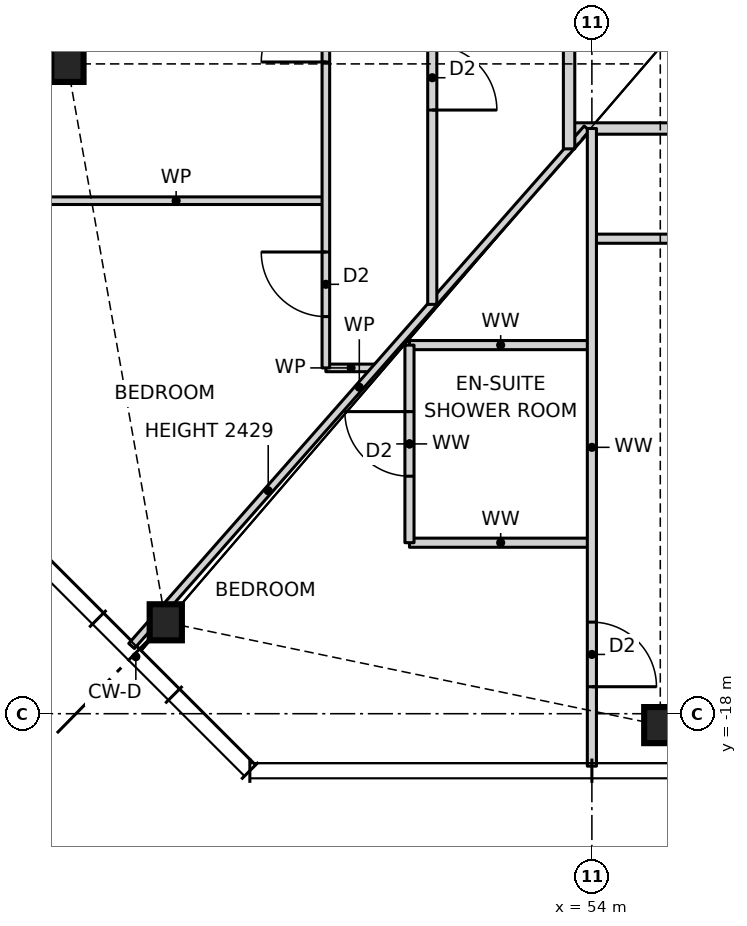
"""IFC4 building model, lengths in metres.
Left out: names, types, materials, properties, quantities, classifications, styles, units other than length and angle.
Written with IfcOpenShell. Run it as: python <this file> out.ifc"""

import sys

from ifc_helpers import new_model, si_unit, direction, frame, frame_2d, origin, origin_2d, place, context, subcontext, project, spatial, rectangle, i_section, extrude, element, fill, save


model = new_model("IFC4")
c1 = context("Model", 3, precision=1e-05, world=origin(), true_north=direction((0.0, 1.0)))
c2 = subcontext(c1, "Body", "Model", "MODEL_VIEW")
j1 = project(units=[si_unit("LENGTHUNIT", "METRE"), si_unit("PLANEANGLEUNIT", "RADIAN")], contexts=[c1])
p1 = place(None, origin())
s1 = spatial("IfcSite", under=j1, at=p1, CompositionType="ELEMENT")
p2 = place(p1, origin())
s2 = spatial("IfcBuilding", under=s1, at=p2, CompositionType="ELEMENT")
p3 = place(p2, frame((0.0, 0.0, 32.5)))
s3 = spatial("IfcBuildingStorey", under=s2, at=p3, CompositionType="ELEMENT", Elevation=32.5)
for number, where, z_axis, x_axis in (
    (1, (48.394, -16.797, 0.0), (0.0, 0.0, 1.0), (1.0, 0.0, 0.0)),
    (2, (54.9, -18.15, 0.0), (0.0, 0.0, 1.0), (1.0, 0.0, 0.0)),
    (3, (47.1, -9.45, 0.0), (0.0, 0.0, 1.0), (1.0, 0.0, 0.0)),
):
    element("IfcColumn", number, at=place(p3, frame(where, z_axis=z_axis, x_axis=x_axis)), inside=s3, PredefinedType="COLUMN", context=c2, shape_type="SweptSolid", body=[
        extrude(i_section(OverallWidth=0.424, OverallDepth=0.475, WebThickness=0.048, FlangeThickness=0.077, at=origin_2d()), origin(), (0.0, 0.0, 1.0), 3.5),
    ])
p4 = place(p3, frame((51.6, -15.75, 0.0), z_axis=(0.0, 0.0, 1.0), x_axis=(1.0, 0.0, 0.0)))
e4 = element("IfcWall", 4, at=p4, inside=s3, PredefinedType="PARTITIONING", context=c2, shape_type="SweptSolid", body=[
    extrude(rectangle(XDim=2.4, YDim=0.12, at=frame_2d((1.2, 0.0))), origin(), (0.0, 0.0, 1.0), 3.27),
])
p5 = place(p3, frame((50.5, -13.45, 0.0), z_axis=(0.0, 0.0, 1.0), x_axis=(1.0, 0.0, 0.0)))
e5 = element("IfcWall", 5, at=p5, inside=s3, PredefinedType="PARTITIONING", context=c2, shape_type="SweptSolid", body=[
    extrude(rectangle(XDim=0.664, YDim=0.1, at=frame_2d((0.332, 0.0))), origin(), (0.0, 0.0, 1.0), 3.27),
])
p6 = place(p3, frame((51.6, -13.15, 0.0), z_axis=(0.0, 0.0, 1.0), x_axis=(1.0, 0.0, 0.0)))
e6 = element("IfcWall", 6, at=p6, inside=s3, PredefinedType="PARTITIONING", context=c2, shape_type="SweptSolid", body=[
    extrude(rectangle(XDim=2.4, YDim=0.12, at=frame_2d((1.2, 0.0))), origin(), (0.0, 0.0, 1.0), 3.27),
])
p7 = place(p3, frame((54.0, -11.75, 0.0), z_axis=(0.0, 0.0, 1.0), x_axis=(1.0, 0.0, 0.0)))
e7 = element("IfcWall", 7, at=p7, inside=s3, PredefinedType="PARTITIONING", context=c2, shape_type="SweptSolid", body=[
    extrude(rectangle(XDim=19.34, YDim=0.12, at=frame_2d((9.67, 0.0))), origin(), (0.0, 0.0, 1.0), 3.27),
])
p8 = place(p7, frame((1.375, 0.0, 0.0)))
e8 = element("IfcOpeningElement", 8, at=p8, cuts=e7, PredefinedType="OPENING", context=c2, shape_type="SweptSolid", body=[
    extrude(rectangle(XDim=0.85, YDim=2.1, at=frame_2d((0.425, 1.05))), frame((0.0, 0.07, 0.0), z_axis=(0.0, -1.0, 0.0), x_axis=(1.0, 0.0, 0.0)), (0.0, 0.0, 1.0), 0.14),
])
p9 = place(p7, frame((4.575, 0.0, 0.0)))
e9 = element("IfcOpeningElement", 9, at=p9, cuts=e7, PredefinedType="OPENING", context=c2, shape_type="SweptSolid", body=[
    extrude(rectangle(XDim=0.85, YDim=2.1, at=frame_2d((0.425, 1.05))), frame((0.0, 0.07, 0.0), z_axis=(0.0, -1.0, 0.0), x_axis=(1.0, 0.0, 0.0)), (0.0, 0.0, 1.0), 0.14),
])
p10 = place(p7, frame((11.325, 0.0, 0.0)))
e10 = element("IfcOpeningElement", 10, at=p10, cuts=e7, PredefinedType="OPENING", context=c2, shape_type="SweptSolid", body=[
    extrude(rectangle(XDim=0.85, YDim=2.1, at=frame_2d((0.425, 1.05))), frame((0.0, 0.07, 0.0), z_axis=(0.0, -1.0, 0.0), x_axis=(1.0, 0.0, 0.0)), (0.0, 0.0, 1.0), 0.14),
])
p11 = place(p7, frame((16.495, 0.0, 0.0)))
e11 = element("IfcOpeningElement", 11, at=p11, cuts=e7, PredefinedType="OPENING", context=c2, shape_type="SweptSolid", body=[
    extrude(rectangle(XDim=0.85, YDim=2.1, at=frame_2d((0.425, 1.05))), frame((0.0, 0.07, 0.0), z_axis=(0.0, -1.0, 0.0), x_axis=(1.0, 0.0, 0.0)), (0.0, 0.0, 1.0), 0.14),
])
p12 = place(p3, frame((46.56, -11.25, 0.0), z_axis=(0.0, 0.0, 1.0), x_axis=(1.0, 0.0, 0.0)))
e12 = element("IfcWall", 12, at=p12, inside=s3, PredefinedType="PARTITIONING", context=c2, shape_type="SweptSolid", body=[
    extrude(rectangle(XDim=3.94, YDim=0.1, at=frame_2d((1.97, 0.0))), origin(), (0.0, 0.0, 1.0), 3.27),
])
p13 = place(p3, frame((53.7, -10.3, 0.0), z_axis=(0.0, 0.0, 1.0), x_axis=(1.0, 0.0, 0.0)))
e13 = element("IfcWall", 13, at=p13, inside=s3, PredefinedType="PARTITIONING", context=c2, shape_type="SweptSolid", body=[
    extrude(rectangle(XDim=18.6, YDim=0.15, at=frame_2d((9.3, 0.0))), origin(), (0.0, 0.0, 1.0), 3.27),
])
p14 = place(p13, frame((4.8, 0.0, 0.0)))
e14 = element("IfcOpeningElement", 14, at=p14, cuts=e13, PredefinedType="OPENING", context=c2, shape_type="SweptSolid", body=[
    extrude(rectangle(XDim=1.0, YDim=2.1, at=frame_2d((0.5, 1.05))), frame((0.0, 0.085, 0.0), z_axis=(0.0, -1.0, 0.0), x_axis=(1.0, 0.0, 0.0)), (0.0, 0.0, 1.0), 0.17),
])
p15 = place(p3, frame((47.944, -17.109, 0.0), z_axis=(0.0, 0.0, 1.0), x_axis=(0.660638210404, 0.750704439146, 0.0)))
e15 = element("IfcWall", 15, at=p15, inside=s3, PredefinedType="PARTITIONING", context=c2, shape_type="SweptSolid", body=[
    extrude(rectangle(XDim=9.07, YDim=0.1, at=frame_2d((4.535, 0.0))), origin(), (0.0, 0.0, 1.0), 2.429),
])
p16 = place(p3, frame((54.0, -18.69, 0.0), z_axis=(0.0, 0.0, 1.0), x_axis=(0.0, 1.0, 0.0)))
e16 = element("IfcWall", 16, at=p16, inside=s3, PredefinedType="PARTITIONING", context=c2, shape_type="SweptSolid", body=[
    extrude(rectangle(XDim=8.39, YDim=0.12, at=frame_2d((4.195, 0.0))), origin(), (0.0, 0.0, 1.0), 3.27),
])
p17 = place(p16, frame((1.045, 0.0, 0.0)))
e17 = element("IfcOpeningElement", 17, at=p17, cuts=e16, PredefinedType="OPENING", context=c2, shape_type="SweptSolid", body=[
    extrude(rectangle(XDim=0.85, YDim=2.1, at=frame_2d((0.425, 1.05))), frame((0.0, 0.07, 0.0), z_axis=(0.0, -1.0, 0.0), x_axis=(1.0, 0.0, 0.0)), (0.0, 0.0, 1.0), 0.14),
])
p18 = place(p3, frame((53.7, -10.568, 0.0), z_axis=(0.0, 0.0, 1.0), x_axis=(0.0, 1.0, 0.0)))
e18 = element("IfcWall", 18, at=p18, inside=s3, PredefinedType="PARTITIONING", context=c2, shape_type="SweptSolid", body=[
    extrude(rectangle(XDim=21.136, YDim=0.15, at=frame_2d((10.568, 0.0))), origin(), (0.0, 0.0, 1.0), 3.27),
])
p19 = place(p18, frame((11.818, 0.0, 0.0)))
e19 = element("IfcOpeningElement", 19, at=p19, cuts=e18, PredefinedType="OPENING", context=c2, shape_type="SweptSolid", body=[
    extrude(rectangle(XDim=1.0, YDim=2.1, at=frame_2d((0.5, 1.05))), frame((0.0, 0.085, 0.0), z_axis=(0.0, -1.0, 0.0), x_axis=(1.0, 0.0, 0.0)), (0.0, 0.0, 1.0), 0.17),
])
p20 = place(p3, frame((51.9, -12.614, 0.0), z_axis=(0.0, 0.0, 1.0), x_axis=(0.0, 1.0, 0.0)))
e20 = element("IfcWall", 20, at=p20, inside=s3, PredefinedType="PARTITIONING", context=c2, shape_type="SweptSolid", body=[
    extrude(rectangle(XDim=25.228, YDim=0.12, at=frame_2d((12.614, 0.0))), origin(), (0.0, 0.0, 1.0), 3.27),
])
p21 = place(p20, frame((17.139, 0.0, 0.0)))
e21 = element("IfcOpeningElement", 21, at=p21, cuts=e20, PredefinedType="OPENING", context=c2, shape_type="SweptSolid", body=[
    extrude(rectangle(XDim=0.85, YDim=2.1, at=frame_2d((0.425, 1.05))), frame((0.0, 0.07, 0.0), z_axis=(0.0, -1.0, 0.0), x_axis=(1.0, 0.0, 0.0)), (0.0, 0.0, 1.0), 0.14),
])
p22 = place(p20, frame((13.939, 0.0, 0.0)))
e22 = element("IfcOpeningElement", 22, at=p22, cuts=e20, PredefinedType="OPENING", context=c2, shape_type="SweptSolid", body=[
    extrude(rectangle(XDim=0.85, YDim=2.1, at=frame_2d((0.425, 1.05))), frame((0.0, 0.07, 0.0), z_axis=(0.0, -1.0, 0.0), x_axis=(1.0, 0.0, 0.0)), (0.0, 0.0, 1.0), 0.14),
])
p23 = place(p20, frame((21.871, 0.0, 0.0)))
e23 = element("IfcOpeningElement", 23, at=p23, cuts=e20, PredefinedType="OPENING", context=c2, shape_type="SweptSolid", body=[
    extrude(rectangle(XDim=0.85, YDim=2.1, at=frame_2d((0.425, 1.05))), frame((0.0, 0.07, 0.0), z_axis=(0.0, -1.0, 0.0), x_axis=(1.0, 0.0, 0.0)), (0.0, 0.0, 1.0), 0.14),
])
p24 = place(p20, frame((7.739, 0.0, 0.0)))
e24 = element("IfcOpeningElement", 24, at=p24, cuts=e20, PredefinedType="OPENING", context=c2, shape_type="SweptSolid", body=[
    extrude(rectangle(XDim=0.85, YDim=2.1, at=frame_2d((0.425, 1.05))), frame((0.0, 0.07, 0.0), z_axis=(0.0, -1.0, 0.0), x_axis=(1.0, 0.0, 0.0)), (0.0, 0.0, 1.0), 0.14),
])
p25 = place(p20, frame((2.557, 0.0, 0.0)))
e25 = element("IfcOpeningElement", 25, at=p25, cuts=e20, PredefinedType="OPENING", context=c2, shape_type="SweptSolid", body=[
    extrude(rectangle(XDim=0.85, YDim=2.1, at=frame_2d((0.425, 1.05))), frame((0.0, 0.07, 0.0), z_axis=(0.0, -1.0, 0.0), x_axis=(1.0, 0.0, 0.0)), (0.0, 0.0, 1.0), 0.14),
])
p26 = place(p3, frame((51.6, -15.75, 0.0), z_axis=(0.0, 0.0, 1.0), x_axis=(0.0, 1.0, 0.0)))
e26 = element("IfcWall", 26, at=p26, inside=s3, PredefinedType="PARTITIONING", context=c2, shape_type="SweptSolid", body=[
    extrude(rectangle(XDim=2.6, YDim=0.12, at=frame_2d((1.3, 0.0))), origin(), (0.0, 0.0, 1.0), 3.27),
])
p27 = place(p26, frame((0.875, 0.0, 0.0)))
e27 = element("IfcOpeningElement", 27, at=p27, cuts=e26, PredefinedType="OPENING", context=c2, shape_type="SweptSolid", body=[
    extrude(rectangle(XDim=0.85, YDim=2.1, at=frame_2d((0.425, 1.05))), frame((0.0, 0.07, 0.0), z_axis=(0.0, -1.0, 0.0), x_axis=(1.0, 0.0, 0.0)), (0.0, 0.0, 1.0), 0.14),
])
p28 = place(p3, frame((50.5, -13.45, 0.0), z_axis=(0.0, 0.0, 1.0), x_axis=(0.0, 1.0, 0.0)))
e28 = element("IfcWall", 28, at=p28, inside=s3, PredefinedType="PARTITIONING", context=c2, shape_type="SweptSolid", body=[
    extrude(rectangle(XDim=11.2, YDim=0.1, at=frame_2d((5.6, 0.0))), origin(), (0.0, 0.0, 1.0), 3.27),
])
p29 = place(p28, frame((8.525, 0.0, 0.0)))
e29 = element("IfcOpeningElement", 29, at=p29, cuts=e28, PredefinedType="OPENING", context=c2, shape_type="SweptSolid", body=[
    extrude(rectangle(XDim=0.85, YDim=2.1, at=frame_2d((0.425, 1.05))), frame((0.0, 0.06, 0.0), z_axis=(0.0, -1.0, 0.0), x_axis=(1.0, 0.0, 0.0)), (0.0, 0.0, 1.0), 0.12),
])
p30 = place(p28, frame((4.025, 0.0, 0.0)))
e30 = element("IfcOpeningElement", 30, at=p30, cuts=e28, PredefinedType="OPENING", context=c2, shape_type="SweptSolid", body=[
    extrude(rectangle(XDim=0.85, YDim=2.1, at=frame_2d((0.425, 1.05))), frame((0.0, 0.06, 0.0), z_axis=(0.0, -1.0, 0.0), x_axis=(1.0, 0.0, 0.0)), (0.0, 0.0, 1.0), 0.12),
])
p31 = place(p28, frame((0.675, 0.0, 0.0)))
e31 = element("IfcOpeningElement", 31, at=p31, cuts=e28, PredefinedType="OPENING", context=c2, shape_type="SweptSolid", body=[
    extrude(rectangle(XDim=0.85, YDim=2.1, at=frame_2d((0.425, 1.05))), frame((0.0, 0.06, 0.0), z_axis=(0.0, -1.0, 0.0), x_axis=(1.0, 0.0, 0.0)), (0.0, 0.0, 1.0), 0.12),
])
p32 = place(p27, origin())
e32 = element("IfcDoor", 32, at=p32, inside=s3, OperationType="SINGLE_SWING_RIGHT", PredefinedType="DOOR", context=c2, shape_type="SweptSolid", body=[
    extrude(rectangle(XDim=0.85, YDim=2.1, at=frame_2d((0.425, 1.05))), frame((0.0, 0.025, 0.0), z_axis=(0.0, -1.0, 0.0), x_axis=(1.0, 0.0, 0.0)), (0.0, 0.0, 1.0), 0.05),
])
fill(e27, e32)
p33 = place(p17, frame((0.85, 0.0, 0.0), z_axis=(0.0, 0.0, 1.0), x_axis=(-1.0, 0.0, 0.0)))
e33 = element("IfcDoor", 33, at=p33, inside=s3, OperationType="SINGLE_SWING_RIGHT", PredefinedType="DOOR", context=c2, shape_type="SweptSolid", body=[
    extrude(rectangle(XDim=0.85, YDim=2.1, at=frame_2d((0.425, 1.05))), frame((0.0, 0.025, 0.0), z_axis=(0.0, -1.0, 0.0), x_axis=(1.0, 0.0, 0.0)), (0.0, 0.0, 1.0), 0.05),
])
fill(e17, e33)
p34 = place(p30, origin())
e34 = element("IfcDoor", 34, at=p34, inside=s3, OperationType="SINGLE_SWING_LEFT", PredefinedType="DOOR", context=c2, shape_type="SweptSolid", body=[
    extrude(rectangle(XDim=0.85, YDim=2.1, at=frame_2d((0.425, 1.05))), frame((0.0, 0.025, 0.0), z_axis=(0.0, -1.0, 0.0), x_axis=(1.0, 0.0, 0.0)), (0.0, 0.0, 1.0), 0.05),
])
fill(e30, e34)
p35 = place(p31, origin())
e35 = element("IfcDoor", 35, at=p35, inside=s3, OperationType="SINGLE_SWING_RIGHT", PredefinedType="DOOR", context=c2, shape_type="SweptSolid", body=[
    extrude(rectangle(XDim=0.85, YDim=2.1, at=frame_2d((0.425, 1.05))), frame((0.0, 0.025, 0.0), z_axis=(0.0, -1.0, 0.0), x_axis=(1.0, 0.0, 0.0)), (0.0, 0.0, 1.0), 0.05),
])
fill(e31, e35)
p36 = place(p25, frame((0.85, 0.0, 0.0), z_axis=(0.0, 0.0, 1.0), x_axis=(-1.0, 0.0, 0.0)))
e36 = element("IfcDoor", 36, at=p36, inside=s3, OperationType="SINGLE_SWING_RIGHT", PredefinedType="DOOR", context=c2, shape_type="SweptSolid", body=[
    extrude(rectangle(XDim=0.85, YDim=2.1, at=frame_2d((0.425, 1.05))), frame((0.0, 0.025, 0.0), z_axis=(0.0, -1.0, 0.0), x_axis=(1.0, 0.0, 0.0)), (0.0, 0.0, 1.0), 0.05),
])
fill(e25, e36)
save(model, sys.argv[1])
